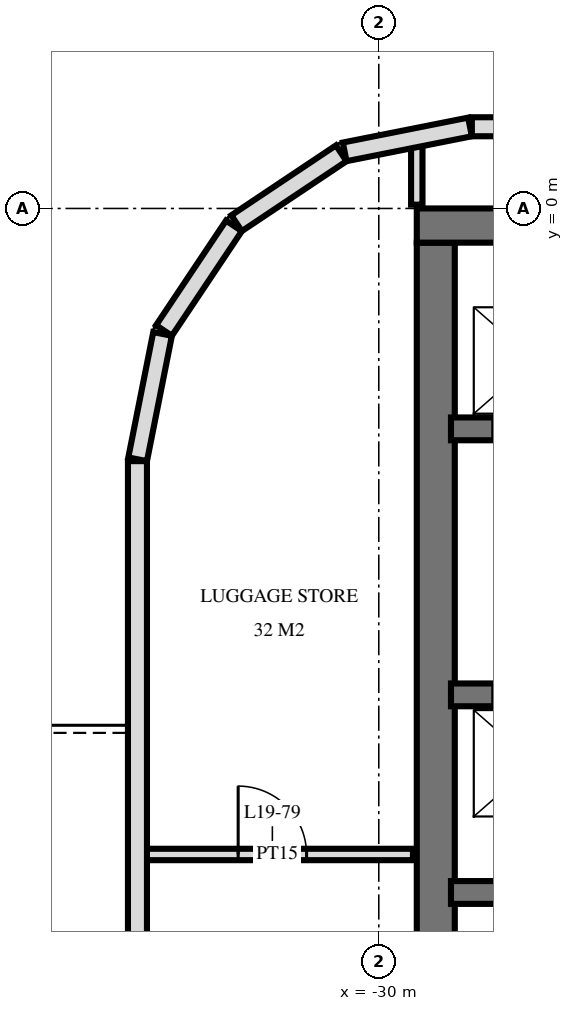
"""IFC4 building model, lengths in metres.
Left out: names, types, materials, properties, quantities, classifications, styles, units other than length and angle.
Written with IfcOpenShell. Run it as: python <this file> out.ifc"""

import sys

from ifc_helpers import new_model, si_unit, direction, frame, frame_2d, origin, place, context, subcontext, project, spatial, rectangle, extrude, element, fill, save


model = new_model("IFC4")
c1 = context("Model", 3, precision=1e-05, world=origin(), true_north=direction((0.0, 1.0)))
c2 = subcontext(c1, "Body", "Model", "MODEL_VIEW")
j1 = project(units=[si_unit("LENGTHUNIT", "METRE"), si_unit("PLANEANGLEUNIT", "RADIAN")], contexts=[c1])
p1 = place(None, origin())
s1 = spatial("IfcSite", under=j1, at=p1, CompositionType="ELEMENT")
p2 = place(p1, origin())
s2 = spatial("IfcBuilding", under=s1, at=p2, CompositionType="ELEMENT")
p3 = place(p2, frame((0.0, 0.0, 78.0)))
s3 = spatial("IfcBuildingStorey", under=s2, at=p3, CompositionType="ELEMENT", Elevation=78.0)
p4 = place(p3, frame((-29.5, -0.225, 0.0), z_axis=(0.0, 0.0, 1.0), x_axis=(1.0, 0.0, 0.0)))
e1 = element("IfcWall", 1, at=p4, inside=s3, PredefinedType="SHEAR", context=c2, shape_type="SweptSolid", body=[
    extrude(rectangle(XDim=19.5, YDim=0.45, at=frame_2d((9.75, 0.0))), origin(), (0.0, 0.0, 1.0), 3.6),
])
p5 = place(p3, frame((-29.25, -14.55, 0.0), z_axis=(0.0, 0.0, 1.0), x_axis=(0.0, 1.0, 0.0)))
e2 = element("IfcWall", 2, at=p5, inside=s3, PredefinedType="SHEAR", context=c2, shape_type="SweptSolid", body=[
    extrude(rectangle(XDim=14.1, YDim=0.5, at=frame_2d((7.05, 0.0))), origin(), (0.0, 0.0, 1.0), 3.6),
])
p6 = place(p3, frame((-29.05, -2.9, 0.0), z_axis=(0.0, 0.0, 1.0), x_axis=(1.0, 0.0, 0.0)))
e3 = element("IfcWall", 3, at=p6, inside=s3, PredefinedType="SHEAR", context=c2, shape_type="SweptSolid", body=[
    extrude(rectangle(XDim=18.7, YDim=0.3, at=frame_2d((9.35, 0.0))), origin(), (0.0, 0.0, 1.0), 3.6),
])
p7 = place(p6, frame((2.95, 0.0, 0.0)))
e4 = element("IfcOpeningElement", 4, at=p7, cuts=e3, PredefinedType="OPENING", context=c2, shape_type="SweptSolid", body=[
    extrude(rectangle(XDim=1.1, YDim=2.1, at=frame_2d((0.55, 1.05))), frame((0.0, 0.16, 0.0), z_axis=(0.0, -1.0, 0.0), x_axis=(1.0, 0.0, 0.0)), (0.0, 0.0, 1.0), 0.32),
])
p8 = place(p6, frame((0.55, 0.0, 0.0)))
e5 = element("IfcOpeningElement", 5, at=p8, cuts=e3, PredefinedType="OPENING", context=c2, shape_type="SweptSolid", body=[
    extrude(rectangle(XDim=1.1, YDim=2.1, at=frame_2d((0.55, 1.05))), frame((0.0, 0.16, 0.0), z_axis=(0.0, -1.0, 0.0), x_axis=(1.0, 0.0, 0.0)), (0.0, 0.0, 1.0), 0.32),
])
p9 = place(p6, frame((11.863, 0.0, 0.0)))
e6 = element("IfcOpeningElement", 6, at=p9, cuts=e3, PredefinedType="OPENING", context=c2, shape_type="SweptSolid", body=[
    extrude(rectangle(XDim=0.9, YDim=2.1, at=frame_2d((0.45, 1.05))), frame((0.0, 0.16, 0.0), z_axis=(0.0, -1.0, 0.0), x_axis=(1.0, 0.0, 0.0)), (0.0, 0.0, 1.0), 0.32),
])
p10 = place(p6, frame((10.438, 0.0, 0.0)))
e7 = element("IfcOpeningElement", 7, at=p10, cuts=e3, PredefinedType="OPENING", context=c2, shape_type="SweptSolid", body=[
    extrude(rectangle(XDim=0.9, YDim=2.1, at=frame_2d((0.45, 1.05))), frame((0.0, 0.16, 0.0), z_axis=(0.0, -1.0, 0.0), x_axis=(1.0, 0.0, 0.0)), (0.0, 0.0, 1.0), 0.32),
])
p11 = place(p6, frame((16.85, 0.0, 0.0)))
e8 = element("IfcOpeningElement", 8, at=p11, cuts=e3, PredefinedType="OPENING", context=c2, shape_type="SweptSolid", body=[
    extrude(rectangle(XDim=1.0, YDim=2.1, at=frame_2d((0.5, 1.05))), frame((0.0, 0.16, 0.0), z_axis=(0.0, -1.0, 0.0), x_axis=(1.0, 0.0, 0.0)), (0.0, 0.0, 1.0), 0.32),
])
p12 = place(p6, frame((14.562, 0.0, 0.0)))
e9 = element("IfcOpeningElement", 9, at=p12, cuts=e3, PredefinedType="OPENING", context=c2, shape_type="SweptSolid", body=[
    extrude(rectangle(XDim=1.0, YDim=2.1, at=frame_2d((0.5, 1.05))), frame((0.0, 0.16, 0.0), z_axis=(0.0, -1.0, 0.0), x_axis=(1.0, 0.0, 0.0)), (0.0, 0.0, 1.0), 0.32),
])
p13 = place(p6, frame((13.137, 0.0, 0.0)))
e10 = element("IfcOpeningElement", 10, at=p13, cuts=e3, PredefinedType="OPENING", context=c2, shape_type="SweptSolid", body=[
    extrude(rectangle(XDim=1.0, YDim=2.1, at=frame_2d((0.5, 1.05))), frame((0.0, 0.16, 0.0), z_axis=(0.0, -1.0, 0.0), x_axis=(1.0, 0.0, 0.0)), (0.0, 0.0, 1.0), 0.32),
])
p14 = place(p6, frame((5.6, 0.0, 0.0)))
e11 = element("IfcOpeningElement", 11, at=p14, cuts=e3, PredefinedType="OPENING", context=c2, shape_type="SweptSolid", body=[
    extrude(rectangle(XDim=1.0, YDim=2.1, at=frame_2d((0.5, 1.05))), frame((0.0, 0.16, 0.0), z_axis=(0.0, -1.0, 0.0), x_axis=(1.0, 0.0, 0.0)), (0.0, 0.0, 1.0), 0.32),
])
p15 = place(p3, frame((-29.05, -6.4, 0.0), z_axis=(0.0, 0.0, 1.0), x_axis=(1.0, 0.0, 0.0)))
e12 = element("IfcWall", 12, at=p15, inside=s3, PredefinedType="SHEAR", context=c2, shape_type="SweptSolid", body=[
    extrude(rectangle(XDim=18.7, YDim=0.3, at=frame_2d((9.35, 0.0))), origin(), (0.0, 0.0, 1.0), 3.6),
])
p16 = place(p15, frame((2.95, 0.0, 0.0)))
e13 = element("IfcOpeningElement", 13, at=p16, cuts=e12, PredefinedType="OPENING", context=c2, shape_type="SweptSolid", body=[
    extrude(rectangle(XDim=1.1, YDim=2.1, at=frame_2d((0.55, 1.05))), frame((0.0, 0.16, 0.0), z_axis=(0.0, -1.0, 0.0), x_axis=(1.0, 0.0, 0.0)), (0.0, 0.0, 1.0), 0.32),
])
p17 = place(p15, frame((0.55, 0.0, 0.0)))
e14 = element("IfcOpeningElement", 14, at=p17, cuts=e12, PredefinedType="OPENING", context=c2, shape_type="SweptSolid", body=[
    extrude(rectangle(XDim=1.1, YDim=2.1, at=frame_2d((0.55, 1.05))), frame((0.0, 0.16, 0.0), z_axis=(0.0, -1.0, 0.0), x_axis=(1.0, 0.0, 0.0)), (0.0, 0.0, 1.0), 0.32),
])
p18 = place(p15, frame((10.8, 0.0, 0.0)))
e15 = element("IfcOpeningElement", 15, at=p18, cuts=e12, PredefinedType="OPENING", context=c2, shape_type="SweptSolid", body=[
    extrude(rectangle(XDim=1.1, YDim=2.1, at=frame_2d((0.55, 1.05))), frame((0.0, 0.16, 0.0), z_axis=(0.0, -1.0, 0.0), x_axis=(1.0, 0.0, 0.0)), (0.0, 0.0, 1.0), 0.32),
])
p19 = place(p15, frame((5.6, 0.0, 0.0)))
e16 = element("IfcOpeningElement", 16, at=p19, cuts=e12, PredefinedType="OPENING", context=c2, shape_type="SweptSolid", body=[
    extrude(rectangle(XDim=1.0, YDim=2.1, at=frame_2d((0.5, 1.05))), frame((0.0, 0.16, 0.0), z_axis=(0.0, -1.0, 0.0), x_axis=(1.0, 0.0, 0.0)), (0.0, 0.0, 1.0), 0.32),
])
p20 = place(p3, frame((-29.05, -9.0, 0.0), z_axis=(0.0, 0.0, 1.0), x_axis=(1.0, 0.0, 0.0)))
e17 = element("IfcWall", 17, at=p20, inside=s3, PredefinedType="SHEAR", context=c2, shape_type="SweptSolid", body=[
    extrude(rectangle(XDim=18.7, YDim=0.3, at=frame_2d((9.35, 0.0))), origin(), (0.0, 0.0, 1.0), 3.6),
])
p21 = place(p20, frame((13.8, 0.0, 0.0)))
e18 = element("IfcOpeningElement", 18, at=p21, cuts=e17, PredefinedType="OPENING", context=c2, shape_type="SweptSolid", body=[
    extrude(rectangle(XDim=1.1, YDim=2.1, at=frame_2d((0.55, 1.05))), frame((0.0, 0.16, 0.0), z_axis=(0.0, -1.0, 0.0), x_axis=(1.0, 0.0, 0.0)), (0.0, 0.0, 1.0), 0.32),
])
p22 = place(p3, frame((28.775, 1.075, 0.0), z_axis=(0.0, 0.0, 1.0), x_axis=(-1.0, 0.0, 0.0)))
e19 = element("IfcWall", 19, at=p22, inside=s3, PredefinedType="SOLIDWALL", context=c2, shape_type="SweptSolid", body=[
    extrude(rectangle(XDim=57.551, YDim=0.25, at=frame_2d((28.775, 0.0))), origin(), (0.0, 0.0, 1.0), 3.32),
])
p23 = place(p22, frame((25.325, 0.0, 0.3)))
e20 = element("IfcOpeningElement", 20, at=p23, cuts=e19, PredefinedType="OPENING", context=c2, shape_type="SweptSolid", body=[
    extrude(rectangle(XDim=2.4, YDim=2.1, at=frame_2d((1.2, 1.05))), frame((0.0, 0.135, 0.0), z_axis=(0.0, -1.0, 0.0), x_axis=(1.0, 0.0, 0.0)), (0.0, 0.0, 1.0), 0.27),
])
p24 = place(p22, frame((30.275, 0.0, 0.3)))
e21 = element("IfcOpeningElement", 21, at=p24, cuts=e19, PredefinedType="OPENING", context=c2, shape_type="SweptSolid", body=[
    extrude(rectangle(XDim=2.4, YDim=2.1, at=frame_2d((1.2, 1.05))), frame((0.0, 0.135, 0.0), z_axis=(0.0, -1.0, 0.0), x_axis=(1.0, 0.0, 0.0)), (0.0, 0.0, 1.0), 0.27),
])
p25 = place(p22, frame((34.825, 0.0, 0.3)))
e22 = element("IfcOpeningElement", 22, at=p25, cuts=e19, PredefinedType="OPENING", context=c2, shape_type="SweptSolid", body=[
    extrude(rectangle(XDim=2.4, YDim=2.1, at=frame_2d((1.2, 1.05))), frame((0.0, 0.135, 0.0), z_axis=(0.0, -1.0, 0.0), x_axis=(1.0, 0.0, 0.0)), (0.0, 0.0, 1.0), 0.27),
])
p26 = place(p3, frame((-28.8, 1.073, 0.0), z_axis=(0.0, 0.0, 1.0), x_axis=(-0.980803419081, -0.194999110559, 0.0)))
e23 = element("IfcWall", 23, at=p26, inside=s3, PredefinedType="SOLIDWALL", context=c2, shape_type="SweptSolid", body=[
    extrude(rectangle(XDim=1.681, YDim=0.25, at=frame_2d((0.841, 0.0))), origin(), (0.0, 0.0, 1.0), 3.32),
])
for number, where, z_axis, x_axis in (
    (24, (-30.494, 0.726, 0.0), (0.0, 0.0, 1.0), (-0.831, -0.556, 0.0)),
    (25, (-31.906, -0.229, 0.0), (0.0, 0.0, 1.0), (-0.556, -0.831, 0.0)),
):
    element("IfcWall", number, at=place(p3, frame(where, z_axis=z_axis, x_axis=x_axis)), inside=s3, PredefinedType="SOLIDWALL", context=c2, shape_type="SweptSolid", body=[
        extrude(rectangle(XDim=1.656, YDim=0.25, at=frame_2d((0.828, 0.0))), origin(), (0.0, 0.0, 1.0), 3.32),
    ])
p27 = place(p3, frame((-32.844, -1.651, 0.0), z_axis=(0.0, 0.0, 1.0), x_axis=(-0.19513878023, -0.980775640221, 0.0)))
e26 = element("IfcWall", 26, at=p27, inside=s3, PredefinedType="SOLIDWALL", context=c2, shape_type="SweptSolid", body=[
    extrude(rectangle(XDim=1.681, YDim=0.25, at=frame_2d((0.841, 0.0))), origin(), (0.0, 0.0, 1.0), 3.32),
])
p28 = place(p3, frame((-33.175, -3.325, 0.0), z_axis=(0.0, 0.0, 1.0), x_axis=(0.0, -1.0, 0.0)))
e27 = element("IfcWall", 27, at=p28, inside=s3, PredefinedType="SOLIDWALL", context=c2, shape_type="SweptSolid", body=[
    extrude(rectangle(XDim=21.551, YDim=0.25, at=frame_2d((10.775, 0.0))), origin(), (0.0, 0.0, 1.0), 3.32),
])
p29 = place(p28, frame((7.525, 0.0, 0.0)))
e28 = element("IfcOpeningElement", 28, at=p29, cuts=e27, PredefinedType="OPENING", context=c2, shape_type="SweptSolid", body=[
    extrude(rectangle(XDim=1.8, YDim=2.4, at=frame_2d((0.9, 1.2))), frame((0.0, 0.135, 0.0), z_axis=(0.0, -1.0, 0.0), x_axis=(1.0, 0.0, 0.0)), (0.0, 0.0, 1.0), 0.27),
])
p30 = place(p28, frame((12.275, 0.0, 0.3)))
e29 = element("IfcOpeningElement", 29, at=p30, cuts=e27, PredefinedType="OPENING", context=c2, shape_type="SweptSolid", body=[
    extrude(rectangle(XDim=1.2, YDim=2.1, at=frame_2d((0.6, 1.05))), frame((0.0, 0.135, 0.0), z_axis=(0.0, -1.0, 0.0), x_axis=(1.0, 0.0, 0.0)), (0.0, 0.0, 1.0), 0.27),
])
p31 = place(p28, frame((15.275, 0.0, 0.0)))
e30 = element("IfcOpeningElement", 30, at=p31, cuts=e27, PredefinedType="OPENING", context=c2, shape_type="SweptSolid", body=[
    extrude(rectangle(XDim=1.8, YDim=2.4, at=frame_2d((0.9, 1.2))), frame((0.0, 0.135, 0.0), z_axis=(0.0, -1.0, 0.0), x_axis=(1.0, 0.0, 0.0)), (0.0, 0.0, 1.0), 0.27),
])
p32 = place(p28, frame((18.875, 0.0, 0.0)))
e31 = element("IfcOpeningElement", 31, at=p32, cuts=e27, PredefinedType="OPENING", context=c2, shape_type="SweptSolid", body=[
    extrude(rectangle(XDim=1.8, YDim=2.4, at=frame_2d((0.9, 1.2))), frame((0.0, 0.135, 0.0), z_axis=(0.0, -1.0, 0.0), x_axis=(1.0, 0.0, 0.0)), (0.0, 0.0, 1.0), 0.27),
])
p33 = place(p3, frame((-29.5, 0.05, 0.0), z_axis=(0.0, 0.0, 1.0), x_axis=(0.0, 1.0, 0.0)))
e32 = element("IfcWall", 32, at=p33, inside=s3, PredefinedType="PARTITIONING", context=c2, shape_type="SweptSolid", body=[
    extrude(rectangle(XDim=0.827, YDim=0.15, at=frame_2d((0.414, 0.0))), origin(), (0.0, 0.0, 1.0), 3.32),
])
p34 = place(p3, frame((-33.12, -8.5, 0.0), z_axis=(0.0, 0.0, 1.0), x_axis=(1.0, 0.0, 0.0)))
e33 = element("IfcWall", 33, at=p34, inside=s3, PredefinedType="PARTITIONING", context=c2, shape_type="SweptSolid", body=[
    extrude(rectangle(XDim=3.57, YDim=0.15, at=frame_2d((1.785, 0.0))), origin(), (0.0, 0.0, 1.0), 3.32),
])
p35 = place(p34, frame((1.27, 0.0, 0.0)))
e34 = element("IfcOpeningElement", 34, at=p35, cuts=e33, PredefinedType="OPENING", context=c2, shape_type="SweptSolid", body=[
    extrude(rectangle(XDim=0.9, YDim=2.1, at=frame_2d((0.45, 1.05))), frame((0.0, 0.085, 0.0), z_axis=(0.0, -1.0, 0.0), x_axis=(1.0, 0.0, 0.0)), (0.0, 0.0, 1.0), 0.17),
])
p36 = place(p35, origin())
e35 = element("IfcDoor", 35, at=p36, inside=s3, OperationType="SINGLE_SWING_RIGHT", PredefinedType="DOOR", context=c2, shape_type="SweptSolid", body=[
    extrude(rectangle(XDim=0.9, YDim=2.1, at=frame_2d((0.45, 1.05))), frame((0.0, 0.025, 0.0), z_axis=(0.0, -1.0, 0.0), x_axis=(1.0, 0.0, 0.0)), (0.0, 0.0, 1.0), 0.05),
])
fill(e34, e35)
save(model, sys.argv[1])
